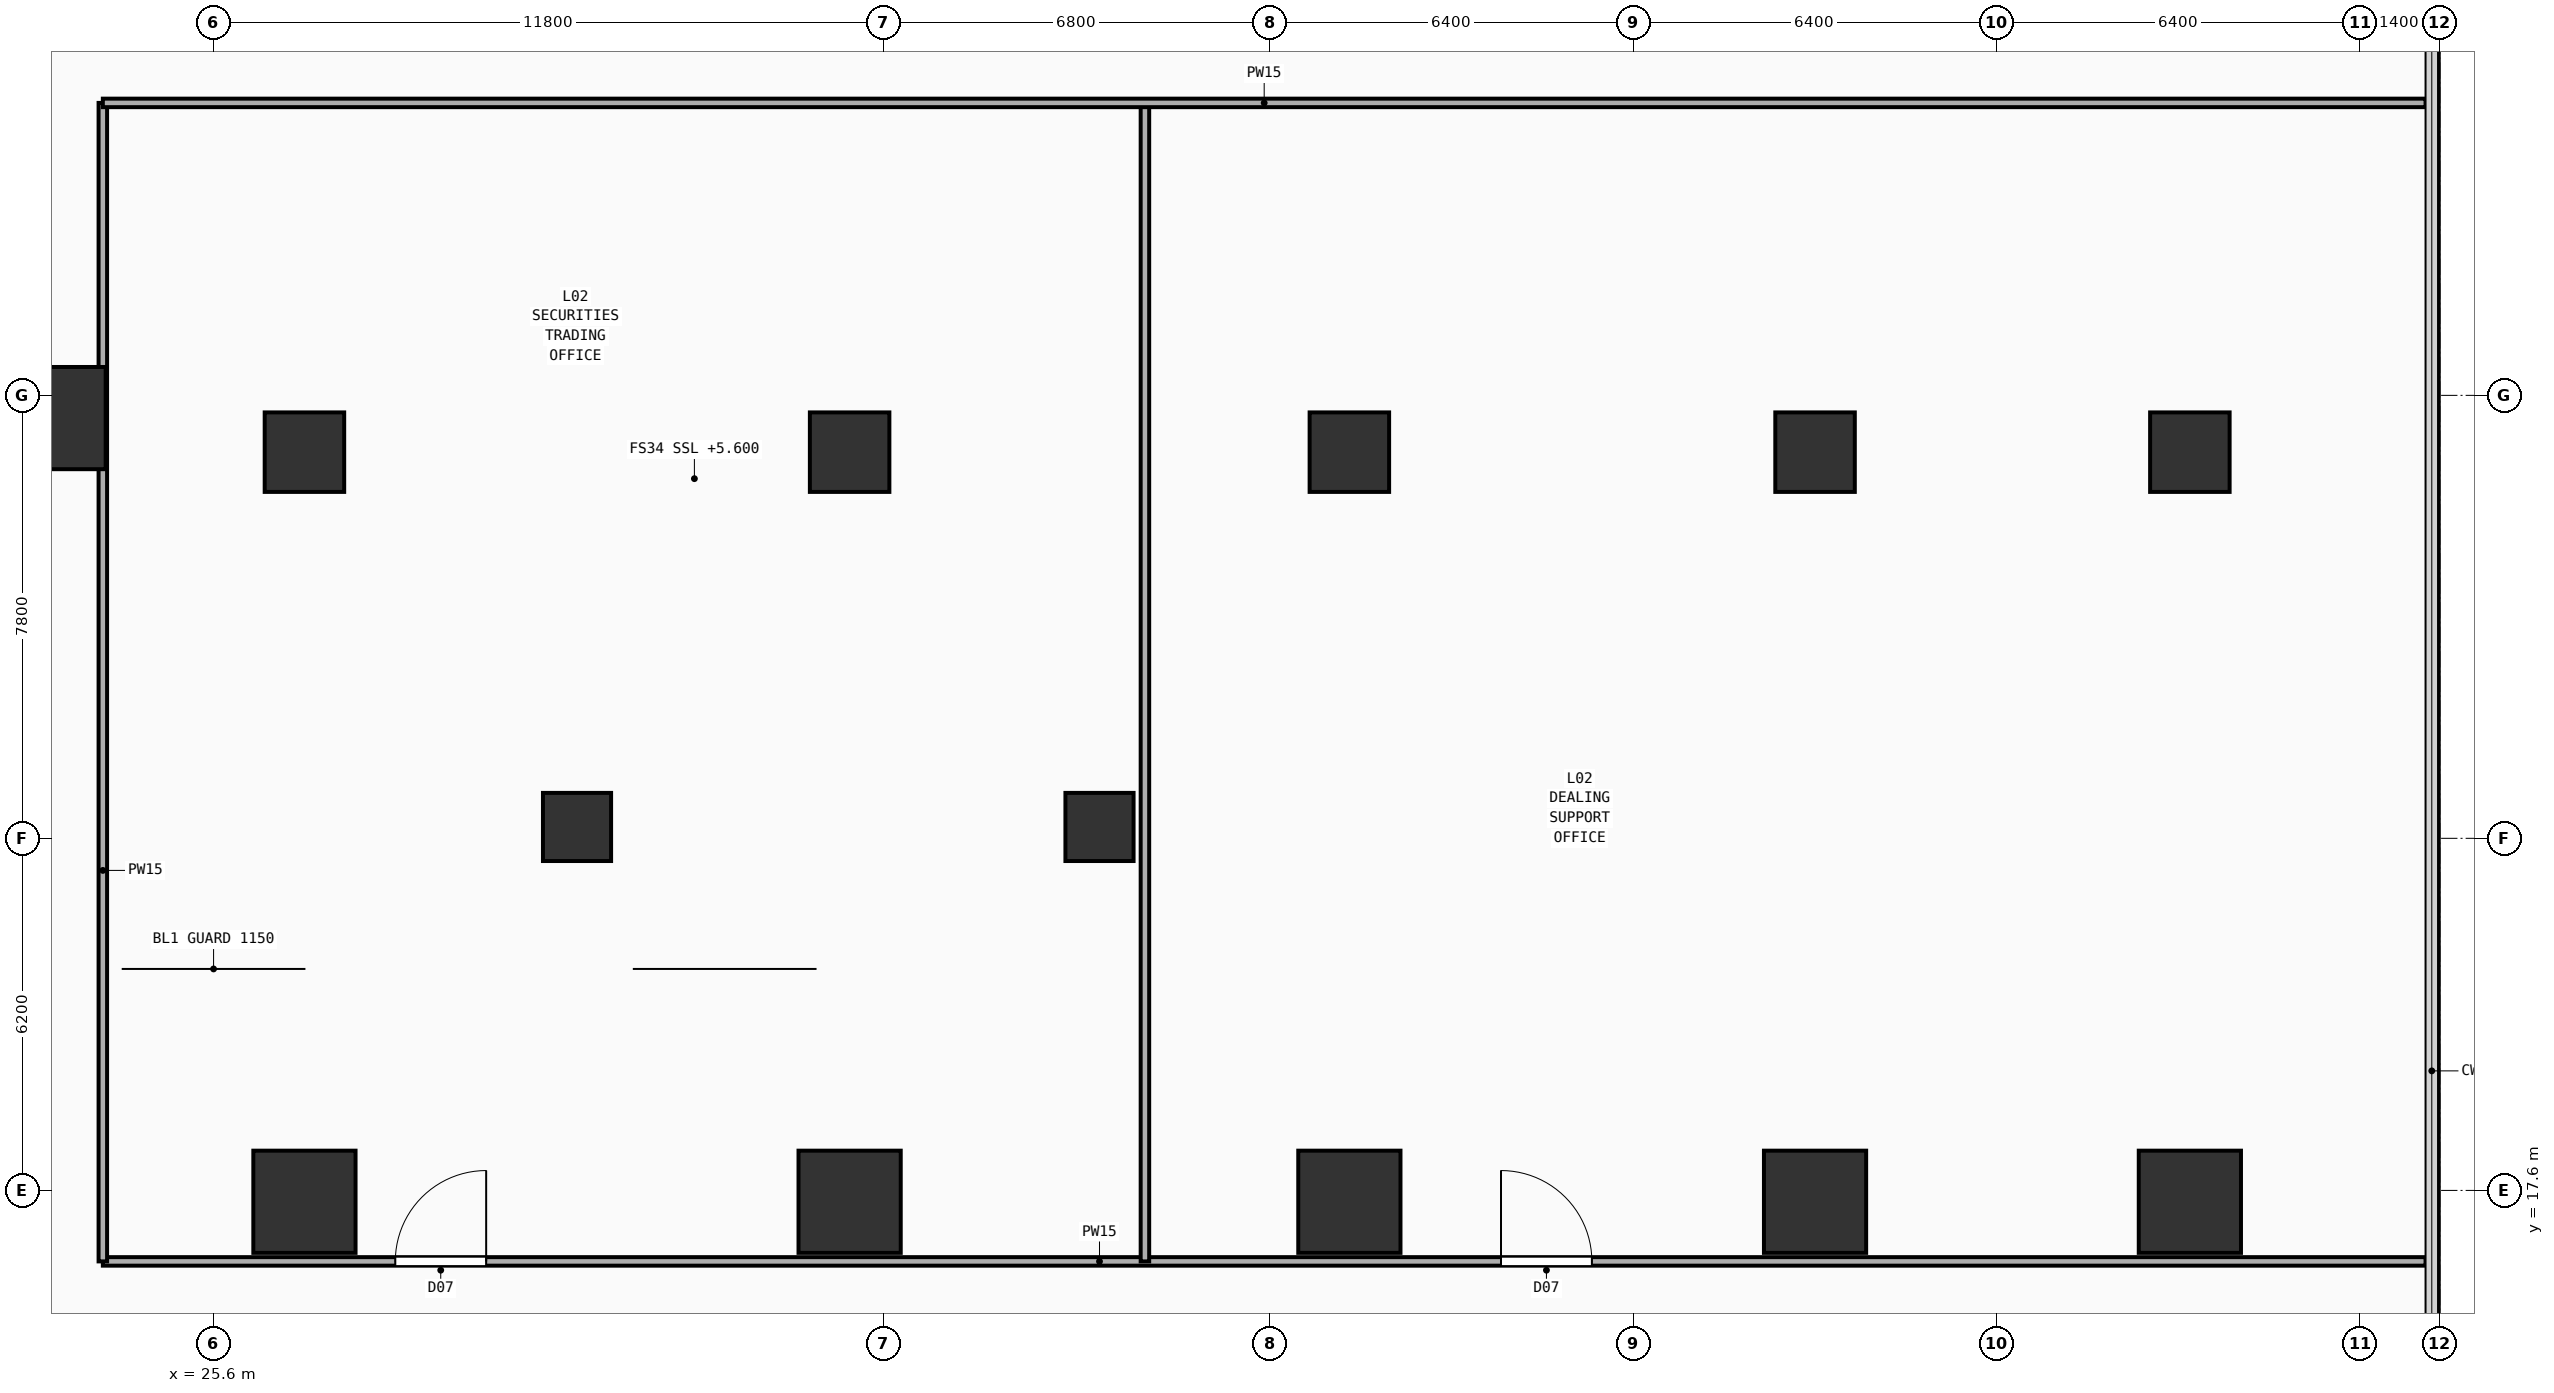
"""IFC4 building model, lengths in metres.
Left out: names, types, materials, properties, quantities, classifications, styles, units other than length and angle.
Written with IfcOpenShell. Run it as: python <this file> out.ifc"""

import sys

from ifc_helpers import new_model, si_unit, direction, frame, frame_2d, origin, origin_2d, place, context, subcontext, project, spatial, rectangle, circle, extrude, element, fill, save


model = new_model("IFC4")
c1 = context("Model", 3, precision=1e-05, world=origin(), true_north=direction((0.0, 1.0)))
c2 = subcontext(c1, "Body", "Model", "MODEL_VIEW")
j1 = project(units=[si_unit("LENGTHUNIT", "METRE"), si_unit("PLANEANGLEUNIT", "RADIAN")], contexts=[c1])
p1 = place(None, origin())
s1 = spatial("IfcSite", under=j1, at=p1, CompositionType="ELEMENT")
p2 = place(p1, origin())
s2 = spatial("IfcBuilding", under=s1, at=p2, CompositionType="ELEMENT")
p3 = place(p2, frame((0.0, 0.0, 5.6)))
s3 = spatial("IfcBuildingStorey", under=s2, at=p3, CompositionType="ELEMENT", Elevation=5.6)
for number, where, z_axis, x_axis in (
    (1, (27.2, 17.4, 0.0), (0.0, 0.0, 1.0), (1.0, 0.0, 0.0)),
    (2, (36.8, 17.4, 0.0), (0.0, 0.0, 1.0), (1.0, 0.0, 0.0)),
    (3, (45.6, 17.4, 0.0), (0.0, 0.0, 1.0), (1.0, 0.0, 0.0)),
    (4, (53.8, 17.4, 0.0), (0.0, 0.0, 1.0), (1.0, 0.0, 0.0)),
    (5, (60.4, 17.4, 0.0), (0.0, 0.0, 1.0), (1.0, 0.0, 0.0)),
    (6, (22.8, 31.2, 0.0), (0.0, 0.0, 1.0), (1.0, 0.0, 0.0)),
):
    element("IfcColumn", number, at=place(p3, frame(where, z_axis=z_axis, x_axis=x_axis)), inside=s3, PredefinedType="COLUMN", context=c2, shape_type="SweptSolid", body=[
        extrude(rectangle(XDim=1.8, YDim=1.8, at=origin_2d()), origin(), (0.0, 0.0, 1.0), 4.46),
    ])
for number, where, z_axis, x_axis in (
    (7, (27.2, 30.6, 0.0), (0.0, 0.0, 1.0), (1.0, 0.0, 0.0)),
    (8, (36.8, 30.6, 0.0), (0.0, 0.0, 1.0), (1.0, 0.0, 0.0)),
    (9, (45.6, 30.6, 0.0), (0.0, 0.0, 1.0), (1.0, 0.0, 0.0)),
    (10, (53.8, 30.6, 0.0), (0.0, 0.0, 1.0), (1.0, 0.0, 0.0)),
    (11, (60.4, 30.6, 0.0), (0.0, 0.0, 1.0), (1.0, 0.0, 0.0)),
):
    element("IfcColumn", number, at=place(p3, frame(where, z_axis=z_axis, x_axis=x_axis)), inside=s3, PredefinedType="COLUMN", context=c2, shape_type="SweptSolid", body=[
        extrude(rectangle(XDim=1.4, YDim=1.4, at=origin_2d()), origin(), (0.0, 0.0, 1.0), 4.46),
    ])
for number, where, z_axis, x_axis in (
    (12, (32.0, 24.0, 0.0), (0.0, 0.0, 1.0), (1.0, 0.0, 0.0)),
    (13, (41.2, 24.0, 0.0), (0.0, 0.0, 1.0), (1.0, 0.0, 0.0)),
):
    element("IfcColumn", number, at=place(p3, frame(where, z_axis=z_axis, x_axis=x_axis)), inside=s3, PredefinedType="COLUMN", context=c2, shape_type="SweptSolid", body=[
        extrude(circle(Radius=0.6, at=origin_2d()), origin(), (0.0, 0.0, 1.0), 4.46),
    ])
p4 = place(p3, frame((23.65, 16.35, 0.0), z_axis=(0.0, 0.0, 1.0), x_axis=(1.0, 0.0, 0.0)))
e14 = element("IfcWall", 14, at=p4, inside=s3, PredefinedType="PARTITIONING", context=c2, shape_type="SweptSolid", body=[
    extrude(rectangle(XDim=40.9, YDim=0.15, at=frame_2d((20.45, 0.0))), origin(), (0.0, 0.0, 1.0), 4.46),
])
p5 = place(p4, frame((5.15, 0.0, 0.0)))
e15 = element("IfcOpeningElement", 15, at=p5, cuts=e14, PredefinedType="OPENING", context=c2, shape_type="SweptSolid", body=[
    extrude(rectangle(XDim=1.6, YDim=2.4, at=frame_2d((0.8, 1.2))), frame((0.0, 0.085, 0.0), z_axis=(0.0, -1.0, 0.0), x_axis=(1.0, 0.0, 0.0)), (0.0, 0.0, 1.0), 0.17),
])
p6 = place(p4, frame((24.62, 0.0, 0.0)))
e16 = element("IfcOpeningElement", 16, at=p6, cuts=e14, PredefinedType="OPENING", context=c2, shape_type="SweptSolid", body=[
    extrude(rectangle(XDim=1.6, YDim=2.4, at=frame_2d((0.8, 1.2))), frame((0.0, 0.085, 0.0), z_axis=(0.0, -1.0, 0.0), x_axis=(1.0, 0.0, 0.0)), (0.0, 0.0, 1.0), 0.17),
])
for number, where, z_axis, x_axis in (
    (17, (23.65, 16.35, 0.0), (0.0, 0.0, 1.0), (0.0, 1.0, 0.0)),
    (18, (42.0, 16.35, 0.0), (0.0, 0.0, 1.0), (0.0, 1.0, 0.0)),
):
    element("IfcWall", number, at=place(p3, frame(where, z_axis=z_axis, x_axis=x_axis)), inside=s3, PredefinedType="PARTITIONING", context=c2, shape_type="SweptSolid", body=[
        extrude(rectangle(XDim=20.4, YDim=0.15, at=frame_2d((10.2, 0.0))), origin(), (0.0, 0.0, 1.0), 4.46),
    ])
p7 = place(p3, frame((23.65, 36.75, 0.0), z_axis=(0.0, 0.0, 1.0), x_axis=(1.0, 0.0, 0.0)))
e19 = element("IfcWall", 19, at=p7, inside=s3, PredefinedType="PARTITIONING", context=c2, shape_type="SweptSolid", body=[
    extrude(rectangle(XDim=40.9, YDim=0.15, at=frame_2d((20.45, 0.0))), origin(), (0.0, 0.0, 1.0), 4.46),
])
p8 = place(p5, origin())
e20 = element("IfcDoor", 20, at=p8, inside=s3, OperationType="SINGLE_SWING_RIGHT", PredefinedType="DOOR", context=c2, shape_type="SweptSolid", body=[
    extrude(rectangle(XDim=1.6, YDim=2.4, at=frame_2d((0.8, 1.2))), frame((0.0, 0.025, 0.0), z_axis=(0.0, -1.0, 0.0), x_axis=(1.0, 0.0, 0.0)), (0.0, 0.0, 1.0), 0.05),
])
fill(e15, e20)
p9 = place(p6, origin())
e21 = element("IfcDoor", 21, at=p9, inside=s3, OperationType="SINGLE_SWING_LEFT", PredefinedType="DOOR", context=c2, shape_type="SweptSolid", body=[
    extrude(rectangle(XDim=1.6, YDim=2.4, at=frame_2d((0.8, 1.2))), frame((0.0, 0.025, 0.0), z_axis=(0.0, -1.0, 0.0), x_axis=(1.0, 0.0, 0.0)), (0.0, 0.0, 1.0), 0.05),
])
fill(e16, e21)
save(model, sys.argv[1])
